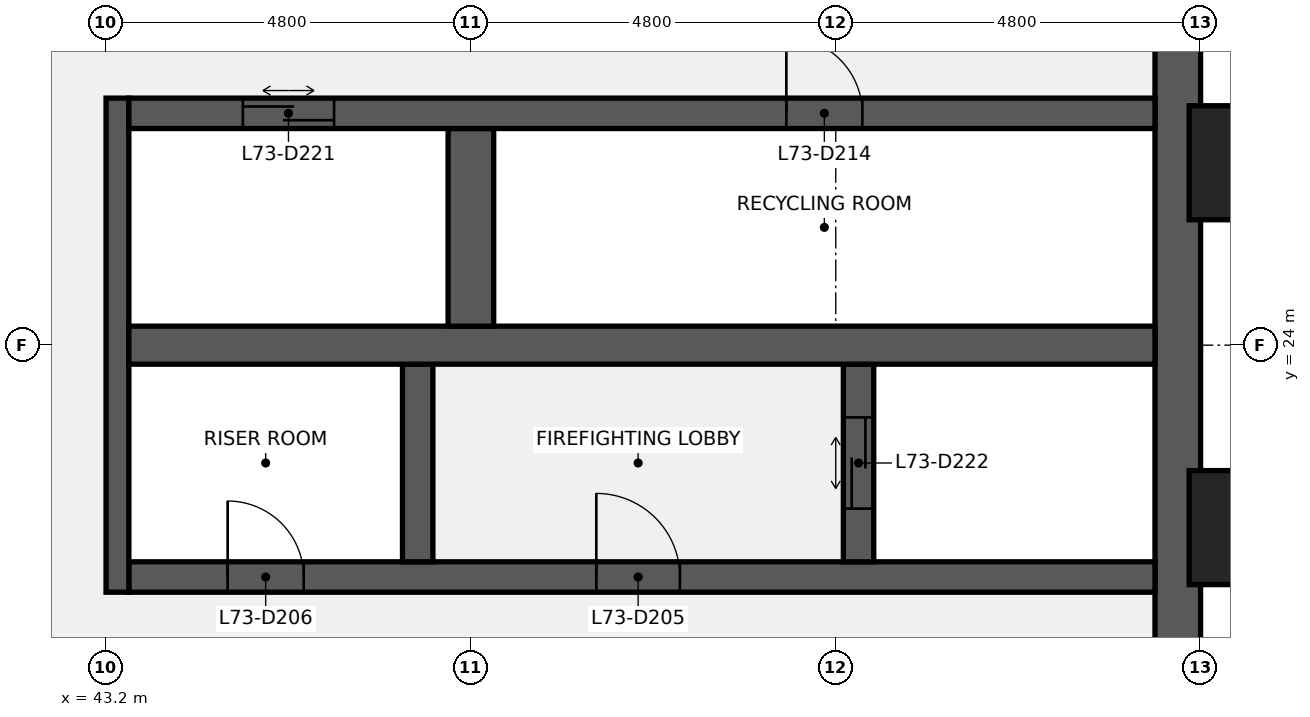
"""IFC4 building model, lengths in metres.
Left out: names, types, materials, properties, quantities, classifications, styles, units other than length and angle.
Written with IfcOpenShell. Run it as: python <this file> out.ifc"""

import sys

from ifc_helpers import new_model, si_unit, direction, frame, frame_2d, origin, origin_2d, place, context, subcontext, project, spatial, rectangle, extrude, element, fill, save


model = new_model("IFC4")
c1 = context("Model", 3, precision=1e-05, world=origin(), true_north=direction((0.0, 1.0)))
c2 = subcontext(c1, "Body", "Model", "MODEL_VIEW")
j1 = project(units=[si_unit("LENGTHUNIT", "METRE"), si_unit("PLANEANGLEUNIT", "RADIAN")], contexts=[c1])
p1 = place(None, origin())
s1 = spatial("IfcSite", under=j1, at=p1, CompositionType="ELEMENT")
p2 = place(p1, origin())
s2 = spatial("IfcBuilding", under=s1, at=p2, CompositionType="ELEMENT")
p3 = place(p2, frame((0.0, 0.0, 330.3)))
s3 = spatial("IfcBuildingStorey", under=s2, at=p3, CompositionType="ELEMENT", Elevation=330.3)
p4 = place(p3, frame((57.3, 38.4, 0.0), z_axis=(0.0, 0.0, 1.0), x_axis=(0.0, -1.0, 0.0)))
e1 = element("IfcWall", 1, at=p4, inside=s3, PredefinedType="SHEAR", context=c2, shape_type="SweptSolid", body=[
    extrude(rectangle(XDim=28.8, YDim=0.6, at=frame_2d((14.4, 0.0))), origin(), (0.0, 0.0, 1.0), 3.84),
])
p5 = place(p4, frame((18.45, 0.0, 0.9)))
e2 = element("IfcOpeningElement", 2, at=p5, cuts=e1, PredefinedType="OPENING", context=c2, shape_type="SweptSolid", body=[
    extrude(rectangle(XDim=1.5, YDim=1.5, at=frame_2d((0.75, 0.75))), frame((0.0, 0.31, 0.0), z_axis=(0.0, -1.0, 0.0), x_axis=(1.0, 0.0, 0.0)), (0.0, 0.0, 1.0), 0.62),
])
p6 = place(p4, frame((8.85, 0.0, 0.9)))
e3 = element("IfcOpeningElement", 3, at=p6, cuts=e1, PredefinedType="OPENING", context=c2, shape_type="SweptSolid", body=[
    extrude(rectangle(XDim=1.5, YDim=1.5, at=frame_2d((0.75, 0.75))), frame((0.0, 0.31, 0.0), z_axis=(0.0, -1.0, 0.0), x_axis=(1.0, 0.0, 0.0)), (0.0, 0.0, 1.0), 0.62),
])
p7 = place(p3, frame((43.5, 20.95, 0.0), z_axis=(0.0, 0.0, 1.0), x_axis=(1.0, 0.0, 0.0)))
e4 = element("IfcWall", 4, at=p7, inside=s3, PredefinedType="SHEAR", context=c2, shape_type="SweptSolid", body=[
    extrude(rectangle(XDim=13.5, YDim=0.4, at=frame_2d((6.75, 0.0))), origin(), (0.0, 0.0, 1.0), 3.84),
])
p8 = place(p7, frame((6.15, 0.0, 0.0)))
e5 = element("IfcOpeningElement", 5, at=p8, cuts=e4, PredefinedType="OPENING", context=c2, shape_type="SweptSolid", body=[
    extrude(rectangle(XDim=1.1, YDim=2.1, at=frame_2d((0.55, 1.05))), frame((0.0, 0.21, 0.0), z_axis=(0.0, -1.0, 0.0), x_axis=(1.0, 0.0, 0.0)), (0.0, 0.0, 1.0), 0.42),
])
p9 = place(p7, frame((1.3, 0.0, 0.0)))
e6 = element("IfcOpeningElement", 6, at=p9, cuts=e4, PredefinedType="OPENING", context=c2, shape_type="SweptSolid", body=[
    extrude(rectangle(XDim=1.0, YDim=2.1, at=frame_2d((0.5, 1.05))), frame((0.0, 0.21, 0.0), z_axis=(0.0, -1.0, 0.0), x_axis=(1.0, 0.0, 0.0)), (0.0, 0.0, 1.0), 0.42),
])
p10 = place(p3, frame((43.35, 20.75, 0.0), z_axis=(0.0, 0.0, 1.0), x_axis=(0.0, 1.0, 0.0)))
e7 = element("IfcWall", 7, at=p10, inside=s3, PredefinedType="SHEAR", context=c2, shape_type="SweptSolid", body=[
    extrude(rectangle(XDim=6.5, YDim=0.3, at=frame_2d((3.25, 0.0))), origin(), (0.0, 0.0, 1.0), 3.84),
])
p11 = place(p3, frame((53.1, 21.15, 0.0), z_axis=(0.0, 0.0, 1.0), x_axis=(0.0, 1.0, 0.0)))
e8 = element("IfcWall", 8, at=p11, inside=s3, PredefinedType="SHEAR", context=c2, shape_type="SweptSolid", body=[
    extrude(rectangle(XDim=2.6, YDim=0.4, at=frame_2d((1.3, 0.0))), origin(), (0.0, 0.0, 1.0), 3.84),
])
p12 = place(p11, frame((0.7, 0.0, 0.0)))
e9 = element("IfcOpeningElement", 9, at=p12, cuts=e8, PredefinedType="OPENING", context=c2, shape_type="SweptSolid", body=[
    extrude(rectangle(XDim=1.2, YDim=2.1, at=frame_2d((0.6, 1.05))), frame((0.0, 0.21, 0.0), z_axis=(0.0, -1.0, 0.0), x_axis=(1.0, 0.0, 0.0)), (0.0, 0.0, 1.0), 0.42),
])
p13 = place(p3, frame((47.3, 21.15, 0.0), z_axis=(0.0, 0.0, 1.0), x_axis=(0.0, 1.0, 0.0)))
e10 = element("IfcWall", 10, at=p13, inside=s3, PredefinedType="SHEAR", context=c2, shape_type="SweptSolid", body=[
    extrude(rectangle(XDim=2.6, YDim=0.4, at=frame_2d((1.3, 0.0))), origin(), (0.0, 0.0, 1.0), 3.84),
])
p14 = place(p3, frame((43.5, 24.0, 0.0), z_axis=(0.0, 0.0, 1.0), x_axis=(1.0, 0.0, 0.0)))
e11 = element("IfcWall", 11, at=p14, inside=s3, PredefinedType="SHEAR", context=c2, shape_type="SweptSolid", body=[
    extrude(rectangle(XDim=13.5, YDim=0.5, at=frame_2d((6.75, 0.0))), origin(), (0.0, 0.0, 1.0), 3.84),
])
p15 = place(p3, frame((48.0, 24.25, 0.0), z_axis=(0.0, 0.0, 1.0), x_axis=(0.0, 1.0, 0.0)))
e12 = element("IfcWall", 12, at=p15, inside=s3, PredefinedType="SHEAR", context=c2, shape_type="SweptSolid", body=[
    extrude(rectangle(XDim=2.6, YDim=0.6, at=frame_2d((1.3, 0.0))), origin(), (0.0, 0.0, 1.0), 3.84),
])
p16 = place(p3, frame((43.5, 27.05, 0.0), z_axis=(0.0, 0.0, 1.0), x_axis=(1.0, 0.0, 0.0)))
e13 = element("IfcWall", 13, at=p16, inside=s3, PredefinedType="SHEAR", context=c2, shape_type="SweptSolid", body=[
    extrude(rectangle(XDim=13.5, YDim=0.4, at=frame_2d((6.75, 0.0))), origin(), (0.0, 0.0, 1.0), 3.84),
])
p17 = place(p16, frame((8.65, 0.0, 0.0)))
e14 = element("IfcOpeningElement", 14, at=p17, cuts=e13, PredefinedType="OPENING", context=c2, shape_type="SweptSolid", body=[
    extrude(rectangle(XDim=1.0, YDim=2.1, at=frame_2d((0.5, 1.05))), frame((0.0, 0.21, 0.0), z_axis=(0.0, -1.0, 0.0), x_axis=(1.0, 0.0, 0.0)), (0.0, 0.0, 1.0), 0.42),
])
p18 = place(p16, frame((1.5, 0.0, 0.0)))
e15 = element("IfcOpeningElement", 15, at=p18, cuts=e13, PredefinedType="OPENING", context=c2, shape_type="SweptSolid", body=[
    extrude(rectangle(XDim=1.2, YDim=2.1, at=frame_2d((0.6, 1.05))), frame((0.0, 0.21, 0.0), z_axis=(0.0, -1.0, 0.0), x_axis=(1.0, 0.0, 0.0)), (0.0, 0.0, 1.0), 0.42),
])
for number, where, z_axis, x_axis in (
    (16, (58.35, 21.6, 0.0), (0.0, 0.0, 1.0), (0.0, 1.0, 0.0)),
    (17, (58.35, 26.4, 0.0), (0.0, 0.0, 1.0), (0.0, 1.0, 0.0)),
):
    element("IfcColumn", number, at=place(p3, frame(where, z_axis=z_axis, x_axis=x_axis)), inside=s3, PredefinedType="PILASTER", context=c2, shape_type="SweptSolid", body=[
        extrude(rectangle(XDim=1.8, YDim=1.5, at=origin_2d()), origin(), (0.0, 0.0, 1.0), 4.0),
    ])
p19 = place(p8, origin())
e18 = element("IfcDoor", 18, at=p19, inside=s3, OperationType="SINGLE_SWING_LEFT", PredefinedType="DOOR", context=c2, shape_type="SweptSolid", body=[
    extrude(rectangle(XDim=1.1, YDim=2.1, at=frame_2d((0.55, 1.05))), frame((0.0, 0.025, 0.0), z_axis=(0.0, -1.0, 0.0), x_axis=(1.0, 0.0, 0.0)), (0.0, 0.0, 1.0), 0.05),
])
fill(e5, e18)
p20 = place(p9, origin())
e19 = element("IfcDoor", 19, at=p20, inside=s3, OperationType="SINGLE_SWING_LEFT", PredefinedType="DOOR", context=c2, shape_type="SweptSolid", body=[
    extrude(rectangle(XDim=1.0, YDim=2.1, at=frame_2d((0.5, 1.05))), frame((0.0, 0.025, 0.0), z_axis=(0.0, -1.0, 0.0), x_axis=(1.0, 0.0, 0.0)), (0.0, 0.0, 1.0), 0.05),
])
fill(e6, e19)
p21 = place(p17, origin())
e20 = element("IfcDoor", 20, at=p21, inside=s3, OperationType="SINGLE_SWING_LEFT", PredefinedType="DOOR", context=c2, shape_type="SweptSolid", body=[
    extrude(rectangle(XDim=1.0, YDim=2.1, at=frame_2d((0.5, 1.05))), frame((0.0, 0.025, 0.0), z_axis=(0.0, -1.0, 0.0), x_axis=(1.0, 0.0, 0.0)), (0.0, 0.0, 1.0), 0.05),
])
fill(e14, e20)
p22 = place(p18, origin())
e21 = element("IfcDoor", 21, at=p22, inside=s3, OperationType="DOUBLE_DOOR_SLIDING", PredefinedType="DOOR", context=c2, shape_type="SweptSolid", body=[
    extrude(rectangle(XDim=1.2, YDim=2.1, at=frame_2d((0.6, 1.05))), frame((0.0, 0.025, 0.0), z_axis=(0.0, -1.0, 0.0), x_axis=(1.0, 0.0, 0.0)), (0.0, 0.0, 1.0), 0.05),
])
fill(e15, e21)
p23 = place(p12, origin())
e22 = element("IfcDoor", 22, at=p23, inside=s3, OperationType="DOUBLE_DOOR_SLIDING", PredefinedType="DOOR", context=c2, shape_type="SweptSolid", body=[
    extrude(rectangle(XDim=1.2, YDim=2.1, at=frame_2d((0.6, 1.05))), frame((0.0, 0.025, 0.0), z_axis=(0.0, -1.0, 0.0), x_axis=(1.0, 0.0, 0.0)), (0.0, 0.0, 1.0), 0.05),
])
fill(e9, e22)
save(model, sys.argv[1])
